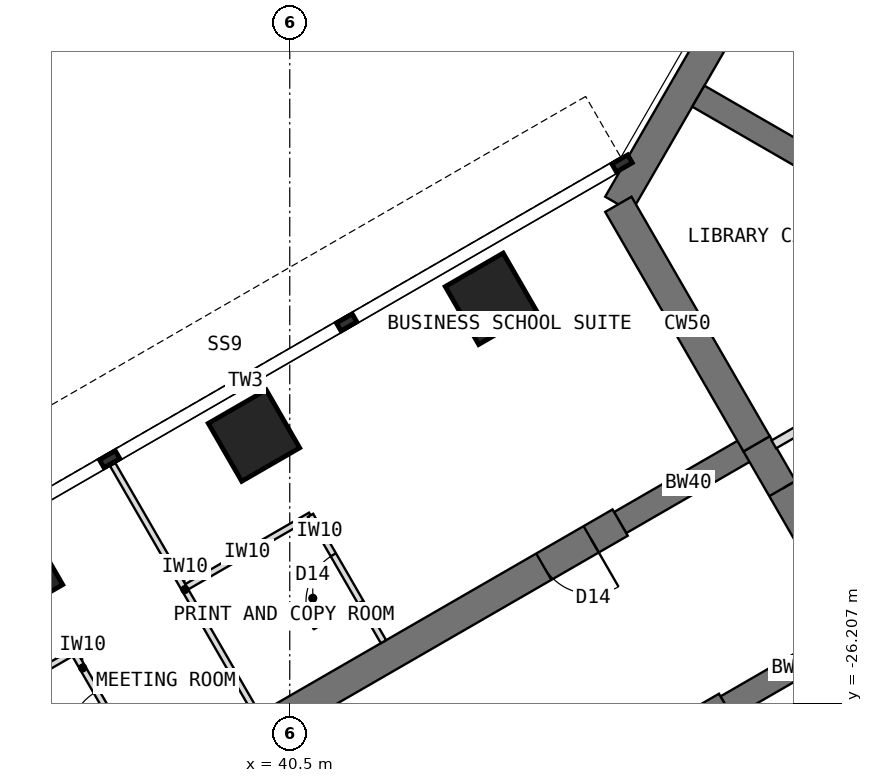
"""IFC4 building model, lengths in metres.
Left out: names, types, materials, properties, quantities, classifications, styles, units other than length and angle.
Written with IfcOpenShell. Run it as: python <this file> out.ifc"""

import sys

from ifc_helpers import new_model, si_unit, direction, frame, frame_2d, origin, origin_2d, place, context, subcontext, project, spatial, rectangle, extrude, element, fill, save


model = new_model("IFC4")
c1 = context("Model", 3, precision=1e-05, world=origin(), true_north=direction((0.0, 1.0)))
c2 = subcontext(c1, "Body", "Model", "MODEL_VIEW")
j1 = project(units=[si_unit("LENGTHUNIT", "METRE"), si_unit("PLANEANGLEUNIT", "RADIAN")], contexts=[c1])
p1 = place(None, origin())
s1 = spatial("IfcSite", under=j1, at=p1, CompositionType="ELEMENT")
p2 = place(p1, origin())
s2 = spatial("IfcBuilding", under=s1, at=p2, CompositionType="ELEMENT")
p3 = place(p2, frame((0.0, 0.0, 218.5)))
s3 = spatial("IfcBuildingStorey", under=s2, at=p3, CompositionType="ELEMENT", Elevation=218.5)
p4 = place(p3, frame((52.202, -7.092, 0.0), z_axis=(0.0, 0.0, 1.0), x_axis=(-0.500005998175, -0.866021940709, 0.0)))
e1 = element("IfcWall", 1, at=p4, inside=s3, PredefinedType="SHEAR", context=c2, shape_type="SweptSolid", body=[
    extrude(rectangle(XDim=12.596, YDim=0.5, at=frame_2d((6.298, 0.0))), origin(), (0.0, 0.0, 1.0), 4.0),
])
p5 = place(p3, frame((45.904, -18.0, 0.0), z_axis=(0.0, 0.0, 1.0), x_axis=(0.500024481964, -0.866011268655, 0.0)))
e2 = element("IfcWall", 2, at=p5, inside=s3, PredefinedType="SHEAR", context=c2, shape_type="SweptSolid", body=[
    extrude(rectangle(XDim=4.548, YDim=0.5, at=frame_2d((2.274, 0.0))), origin(), (0.0, 0.0, 1.0), 4.0),
])
p6 = place(p3, frame((48.178, -21.939, 0.0), z_axis=(0.0, 0.0, 1.0), x_axis=(0.500010275428, -0.866019471182, 0.0)))
e3 = element("IfcWall", 3, at=p6, inside=s3, PredefinedType="SHEAR", context=c2, shape_type="SweptSolid", body=[
    extrude(rectangle(XDim=3.5, YDim=0.5, at=frame_2d((1.75, 0.0))), origin(), (0.0, 0.0, 1.0), 4.0),
])
p7 = place(p6, frame((0.85, 0.0, 0.0)))
e4 = element("IfcOpeningElement", 4, at=p7, cuts=e3, PredefinedType="OPENING", context=c2, shape_type="SweptSolid", body=[
    extrude(rectangle(XDim=1.8, YDim=2.1, at=frame_2d((0.9, 1.05))), frame((0.0, 0.26, 0.0), z_axis=(0.0, -1.0, 0.0), x_axis=(1.0, 0.0, 0.0)), (0.0, 0.0, 1.0), 0.52),
])
p8 = place(p3, frame((49.928, -24.97, 0.0), z_axis=(0.0, 0.0, 1.0), x_axis=(-0.866031863473, -0.499988811324, 0.0)))
e5 = element("IfcWall", 5, at=p8, inside=s3, PredefinedType="SHEAR", context=c2, shape_type="SweptSolid", body=[
    extrude(rectangle(XDim=2.592, YDim=0.4, at=frame_2d((1.296, 0.0))), origin(), (0.0, 0.0, 1.0), 4.0),
])
p9 = place(p3, frame((47.684, -26.266, 0.0), z_axis=(0.0, 0.0, 1.0), x_axis=(-0.866027579429, -0.499996231654, 0.0)))
e6 = element("IfcWall", 6, at=p9, inside=s3, PredefinedType="SHEAR", context=c2, shape_type="SweptSolid", body=[
    extrude(rectangle(XDim=13.2, YDim=0.5, at=frame_2d((6.6, 0.0))), origin(), (0.0, 0.0, 1.0), 4.0),
])
p10 = place(p9, frame((0.55, 0.0, 0.0)))
e7 = element("IfcOpeningElement", 7, at=p10, cuts=e6, PredefinedType="OPENING", context=c2, shape_type="SweptSolid", body=[
    extrude(rectangle(XDim=0.9, YDim=2.1, at=frame_2d((0.45, 1.05))), frame((0.0, 0.26, 0.0), z_axis=(0.0, -1.0, 0.0), x_axis=(1.0, 0.0, 0.0)), (0.0, 0.0, 1.0), 0.52),
])
p11 = place(p9, frame((7.3, 0.0, 0.0)))
e8 = element("IfcOpeningElement", 8, at=p11, cuts=e6, PredefinedType="OPENING", context=c2, shape_type="SweptSolid", body=[
    extrude(rectangle(XDim=0.9, YDim=2.1, at=frame_2d((0.45, 1.05))), frame((0.0, 0.26, 0.0), z_axis=(0.0, -1.0, 0.0), x_axis=(1.0, 0.0, 0.0)), (0.0, 0.0, 1.0), 0.52),
])
p12 = place(p3, frame((48.178, -21.939, 0.0), z_axis=(0.0, 0.0, 1.0), x_axis=(-0.866072649678, -0.499918158782, 0.0)))
e9 = element("IfcWall", 9, at=p12, inside=s3, PredefinedType="SHEAR", context=c2, shape_type="SweptSolid", body=[
    extrude(rectangle(XDim=2.592, YDim=0.4, at=frame_2d((1.296, 0.0))), origin(), (0.0, 0.0, 1.0), 4.0),
])
p13 = place(p3, frame((45.934, -23.234, 0.0), z_axis=(0.0, 0.0, 1.0), x_axis=(-0.866019570528, -0.500010103361, 0.0)))
e10 = element("IfcWall", 10, at=p13, inside=s3, PredefinedType="SHEAR", context=c2, shape_type="SweptSolid", body=[
    extrude(rectangle(XDim=13.2, YDim=0.5, at=frame_2d((6.6, 0.0))), origin(), (0.0, 0.0, 1.0), 4.0),
])
p14 = place(p13, frame((0.55, 0.0, 0.0)))
e11 = element("IfcOpeningElement", 11, at=p14, cuts=e10, PredefinedType="OPENING", context=c2, shape_type="SweptSolid", body=[
    extrude(rectangle(XDim=0.9, YDim=2.1, at=frame_2d((0.45, 1.05))), frame((0.0, 0.26, 0.0), z_axis=(0.0, -1.0, 0.0), x_axis=(1.0, 0.0, 0.0)), (0.0, 0.0, 1.0), 0.52),
])
p15 = place(p13, frame((7.3, 0.0, 0.0)))
e12 = element("IfcOpeningElement", 12, at=p15, cuts=e10, PredefinedType="OPENING", context=c2, shape_type="SweptSolid", body=[
    extrude(rectangle(XDim=0.9, YDim=2.1, at=frame_2d((0.45, 1.05))), frame((0.0, 0.26, 0.0), z_axis=(0.0, -1.0, 0.0), x_axis=(1.0, 0.0, 0.0)), (0.0, 0.0, 1.0), 0.52),
])
for number, where, z_axis, x_axis in (
    (13, (43.809, -19.554, 0.0), (0.0, 0.0, 1.0), (0.866, 0.5, 0.0)),
    (14, (39.912, -21.804, 0.0), (0.0, 0.0, 1.0), (0.866, 0.5, 0.0)),
    (15, (36.014, -24.054, 0.0), (0.0, 0.0, 1.0), (0.866, 0.5, 0.0)),
):
    element("IfcColumn", number, at=place(p3, frame(where, z_axis=z_axis, x_axis=x_axis)), inside=s3, PredefinedType="COLUMN", context=c2, shape_type="SweptSolid", body=[
        extrude(rectangle(XDim=1.1, YDim=1.1, at=origin_2d()), origin(), (0.0, 0.0, 1.0), 4.0),
    ])
p16 = place(p3, frame((52.38, -19.201, 0.0), z_axis=(0.0, 0.0, 1.0), x_axis=(-0.866012946976, 0.500021575205, 0.0)))
e16 = element("IfcWall", 16, at=p16, inside=s3, PredefinedType="SHEAR", context=c2, shape_type="SweptSolid", body=[
    extrude(rectangle(XDim=5.958, YDim=0.4, at=frame_2d((2.979, 0.0))), origin(), (0.0, 0.0, 1.0), 4.0),
])
p17 = place(p3, frame((39.963, -26.393, 0.0), z_axis=(0.0, 0.0, 1.0), x_axis=(-0.499986429846, 0.866033238375, 0.0)))
e17 = element("IfcWall", 17, at=p17, inside=s3, PredefinedType="PARTITIONING", context=c2, shape_type="SweptSolid", body=[
    extrude(rectangle(XDim=4.75, YDim=0.1, at=frame_2d((2.375, 0.0))), origin(), (0.0, 0.0, 1.0), 3.8),
])
p18 = place(p3, frame((40.842, -23.115, 0.0), z_axis=(0.0, 0.0, 1.0), x_axis=(-0.866050077142, -0.499957262057, 0.0)))
e18 = element("IfcWall", 18, at=p18, inside=s3, PredefinedType="PARTITIONING", context=c2, shape_type="SweptSolid", body=[
    extrude(rectangle(XDim=2.4, YDim=0.1, at=frame_2d((1.2, 0.0))), origin(), (0.0, 0.0, 1.0), 3.8),
])
p19 = place(p3, frame((42.042, -25.193, 0.0), z_axis=(0.0, 0.0, 1.0), x_axis=(-0.500001309137, 0.866024647952, 0.0)))
e19 = element("IfcWall", 19, at=p19, inside=s3, PredefinedType="PARTITIONING", context=c2, shape_type="SweptSolid", body=[
    extrude(rectangle(XDim=2.4, YDim=0.1, at=frame_2d((1.2, 0.0))), origin(), (0.0, 0.0, 1.0), 3.8),
])
p20 = place(p19, frame((0.75, 0.0, 0.0)))
e20 = element("IfcOpeningElement", 20, at=p20, cuts=e19, PredefinedType="OPENING", context=c2, shape_type="SweptSolid", body=[
    extrude(rectangle(XDim=0.9, YDim=2.1, at=frame_2d((0.45, 1.05))), frame((0.0, 0.06, 0.0), z_axis=(0.0, -1.0, 0.0), x_axis=(1.0, 0.0, 0.0)), (0.0, 0.0, 1.0), 0.12),
])
p21 = place(p3, frame((36.944, -25.365, 0.0), z_axis=(0.0, 0.0, 1.0), x_axis=(-0.866024647952, -0.500001309137, 0.0)))
e21 = element("IfcWall", 21, at=p21, inside=s3, PredefinedType="PARTITIONING", context=c2, shape_type="SweptSolid", body=[
    extrude(rectangle(XDim=2.4, YDim=0.1, at=frame_2d((1.2, 0.0))), origin(), (0.0, 0.0, 1.0), 3.8),
])
p22 = place(p3, frame((38.144, -27.443, 0.0), z_axis=(0.0, 0.0, 1.0), x_axis=(-0.500001309137, 0.866024647952, 0.0)))
e22 = element("IfcWall", 22, at=p22, inside=s3, PredefinedType="PARTITIONING", context=c2, shape_type="SweptSolid", body=[
    extrude(rectangle(XDim=2.4, YDim=0.1, at=frame_2d((1.2, 0.0))), origin(), (0.0, 0.0, 1.0), 3.8),
])
p23 = place(p22, frame((0.75, 0.0, 0.0)))
e23 = element("IfcOpeningElement", 23, at=p23, cuts=e22, PredefinedType="OPENING", context=c2, shape_type="SweptSolid", body=[
    extrude(rectangle(XDim=0.9, YDim=2.1, at=frame_2d((0.45, 1.05))), frame((0.0, 0.06, 0.0), z_axis=(0.0, -1.0, 0.0), x_axis=(1.0, 0.0, 0.0)), (0.0, 0.0, 1.0), 0.12),
])
p24 = place(p3, frame((48.461, -21.948, 0.0), z_axis=(0.0, 0.0, 1.0), x_axis=(0.866024503882, 0.500001558674, 0.0)))
e24 = element("IfcWall", 24, at=p24, inside=s3, PredefinedType="PARTITIONING", context=c2, shape_type="SweptSolid", body=[
    extrude(rectangle(XDim=4.568, YDim=0.15, at=frame_2d((2.284, 0.0))), origin(), (0.0, 0.0, 1.0), 3.8),
])
p25 = place(p24, frame((1.774, 0.0, 0.0)))
e25 = element("IfcOpeningElement", 25, at=p25, cuts=e24, PredefinedType="OPENING", context=c2, shape_type="SweptSolid", body=[
    extrude(rectangle(XDim=1.0, YDim=2.1, at=frame_2d((0.5, 1.05))), frame((0.0, 0.085, 0.0), z_axis=(0.0, -1.0, 0.0), x_axis=(1.0, 0.0, 0.0)), (0.0, 0.0, 1.0), 0.17),
])
p26 = place(p7, origin())
e26 = element("IfcDoor", 26, at=p26, inside=s3, OperationType="DOUBLE_DOOR_DOUBLE_SWING", PredefinedType="DOOR", context=c2, shape_type="SweptSolid", body=[
    extrude(rectangle(XDim=1.8, YDim=2.1, at=frame_2d((0.9, 1.05))), frame((0.0, 0.025, 0.0), z_axis=(0.0, -1.0, 0.0), x_axis=(1.0, 0.0, 0.0)), (0.0, 0.0, 1.0), 0.05),
])
fill(e4, e26)
p27 = place(p20, origin())
e27 = element("IfcDoor", 27, at=p27, inside=s3, OperationType="SINGLE_SWING_LEFT", PredefinedType="DOOR", context=c2, shape_type="SweptSolid", body=[
    extrude(rectangle(XDim=0.9, YDim=2.1, at=frame_2d((0.45, 1.05))), frame((0.0, 0.025, 0.0), z_axis=(0.0, -1.0, 0.0), x_axis=(1.0, 0.0, 0.0)), (0.0, 0.0, 1.0), 0.05),
])
fill(e20, e27)
p28 = place(p23, origin())
e28 = element("IfcDoor", 28, at=p28, inside=s3, OperationType="SINGLE_SWING_LEFT", PredefinedType="DOOR", context=c2, shape_type="SweptSolid", body=[
    extrude(rectangle(XDim=0.9, YDim=2.1, at=frame_2d((0.45, 1.05))), frame((0.0, 0.025, 0.0), z_axis=(0.0, -1.0, 0.0), x_axis=(1.0, 0.0, 0.0)), (0.0, 0.0, 1.0), 0.05),
])
fill(e23, e28)
p29 = place(p14, origin())
e29 = element("IfcDoor", 29, at=p29, inside=s3, OperationType="SINGLE_SWING_LEFT", PredefinedType="DOOR", context=c2, shape_type="SweptSolid", body=[
    extrude(rectangle(XDim=0.9, YDim=2.1, at=frame_2d((0.45, 1.05))), frame((0.0, 0.025, 0.0), z_axis=(0.0, -1.0, 0.0), x_axis=(1.0, 0.0, 0.0)), (0.0, 0.0, 1.0), 0.05),
])
fill(e11, e29)
save(model, sys.argv[1])
